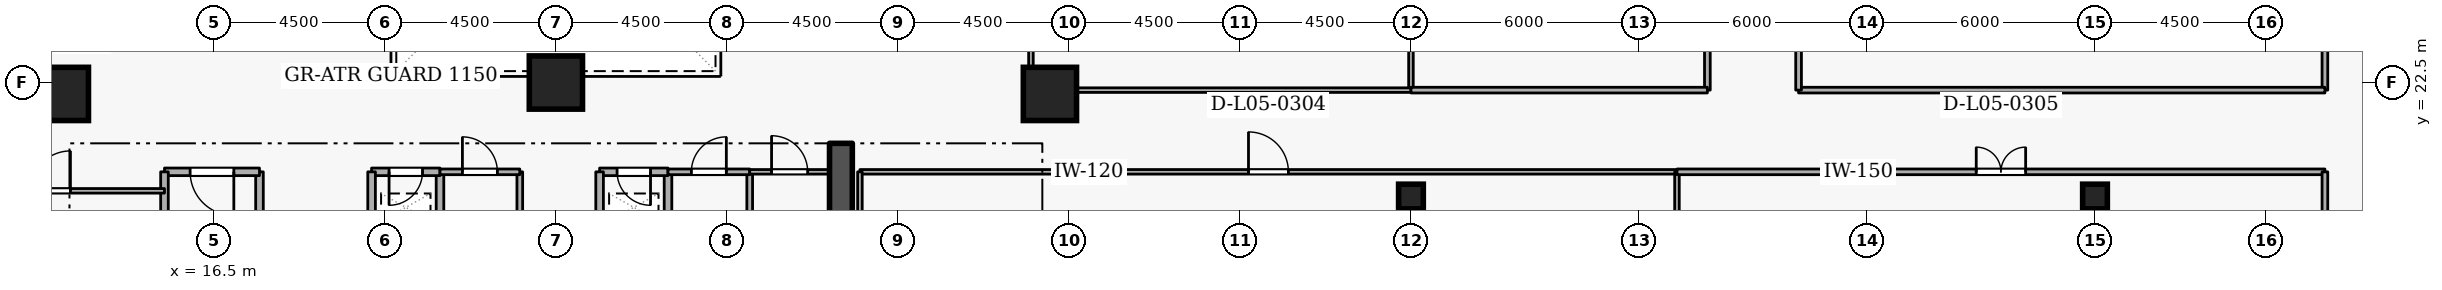
"""IFC4 building model, lengths in metres.
Left out: names, types, materials, properties, quantities, classifications, styles, units other than length and angle.
Written with IfcOpenShell. Run it as: python <this file> out.ifc"""

import sys

from ifc_helpers import new_model, si_unit, direction, frame, frame_2d, origin, origin_2d, place, context, subcontext, project, spatial, rectangle, extrude, element, fill, save


model = new_model("IFC4")
c1 = context("Model", 3, precision=1e-05, world=origin(), true_north=direction((0.0, 1.0)))
c2 = subcontext(c1, "Body", "Model", "MODEL_VIEW")
j1 = project(units=[si_unit("LENGTHUNIT", "METRE"), si_unit("PLANEANGLEUNIT", "RADIAN")], contexts=[c1])
p1 = place(None, origin())
s1 = spatial("IfcSite", under=j1, at=p1, CompositionType="ELEMENT")
p2 = place(p1, origin())
s2 = spatial("IfcBuilding", under=s1, at=p2, CompositionType="ELEMENT")
p3 = place(p2, frame((0.0, 0.0, 23.1)))
s3 = spatial("IfcBuildingStorey", under=s2, at=p3, CompositionType="ELEMENT", Elevation=23.1)
p4 = place(p3, frame((33.0, 15.2, 0.0), z_axis=(0.0, 0.0, 1.0), x_axis=(0.0, 1.0, 0.0)))
e1 = element("IfcWall", 1, at=p4, inside=s3, PredefinedType="SHEAR", context=c2, shape_type="SweptSolid", body=[
    extrude(rectangle(XDim=5.7, YDim=0.6, at=frame_2d((2.85, 0.0))), origin(), (0.0, 0.0, 1.0), 4.8),
])
for number, where, z_axis, x_axis in (
    (2, (12.5, 22.2, 0.0), (0.0, 0.0, 1.0), (1.0, 0.0, 0.0)),
    (3, (38.5, 22.2, 0.0), (0.0, 0.0, 1.0), (1.0, 0.0, 0.0)),
    (4, (25.5, 22.5, 0.0), (0.0, 0.0, 1.0), (1.0, 0.0, 0.0)),
):
    element("IfcColumn", number, at=place(p3, frame(where, z_axis=z_axis, x_axis=x_axis)), inside=s3, PredefinedType="COLUMN", context=c2, shape_type="SweptSolid", body=[
        extrude(rectangle(XDim=1.4, YDim=1.4, at=origin_2d()), origin(), (0.0, 0.0, 1.0), 4.8),
    ])
for number, where, z_axis, x_axis in (
    (5, (48.0, 19.5, 0.0), (0.0, 0.0, 1.0), (1.0, 0.0, 0.0)),
    (6, (66.0, 19.5, 0.0), (0.0, 0.0, 1.0), (1.0, 0.0, 0.0)),
):
    element("IfcColumn", number, at=place(p3, frame(where, z_axis=z_axis, x_axis=x_axis)), inside=s3, PredefinedType="COLUMN", context=c2, shape_type="SweptSolid", body=[
        extrude(rectangle(XDim=0.65, YDim=0.65, at=origin_2d()), origin(), (0.0, 0.0, 1.0), 4.8),
    ])
p5 = place(p3, frame((17.7, 18.4, 0.0), z_axis=(0.0, 0.0, 1.0), x_axis=(0.0, 1.0, 0.0)))
e7 = element("IfcWall", 7, at=p5, inside=s3, PredefinedType="STANDARD", context=c2, shape_type="SweptSolid", body=[
    extrude(rectangle(XDim=1.75, YDim=0.2, at=frame_2d((0.875, 0.0))), origin(), (0.0, 0.0, 1.0), 3.745),
])
p6 = place(p3, frame((17.7, 20.15, 0.0), z_axis=(0.0, 0.0, 1.0), x_axis=(-1.0, 0.0, 0.0)))
e8 = element("IfcWall", 8, at=p6, inside=s3, PredefinedType="STANDARD", context=c2, shape_type="SweptSolid", body=[
    extrude(rectangle(XDim=2.5, YDim=0.2, at=frame_2d((1.25, 0.0))), origin(), (0.0, 0.0, 1.0), 4.54),
])
p7 = place(p6, frame((0.675, 0.0, 0.0)))
e9 = element("IfcOpeningElement", 9, at=p7, cuts=e8, PredefinedType="OPENING", context=c2, shape_type="SweptSolid", body=[
    extrude(rectangle(XDim=1.15, YDim=2.1, at=frame_2d((0.575, 1.05))), frame((0.0, 0.11, 0.0), z_axis=(0.0, -1.0, 0.0), x_axis=(1.0, 0.0, 0.0)), (0.0, 0.0, 1.0), 0.22),
])
p8 = place(p3, frame((15.2, 20.15, 0.0), z_axis=(0.0, 0.0, 1.0), x_axis=(0.0, -1.0, 0.0)))
e10 = element("IfcWall", 10, at=p8, inside=s3, PredefinedType="STANDARD", context=c2, shape_type="SweptSolid", body=[
    extrude(rectangle(XDim=5.15, YDim=0.2, at=frame_2d((2.575, 0.0))), origin(), (0.0, 0.0, 1.0), 4.54),
])
p9 = place(p3, frame((28.45, 18.65, 0.0), z_axis=(0.0, 0.0, 1.0), x_axis=(0.0, 1.0, 0.0)))
e11 = element("IfcWall", 11, at=p9, inside=s3, PredefinedType="STANDARD", context=c2, shape_type="SweptSolid", body=[
    extrude(rectangle(XDim=1.5, YDim=0.2, at=frame_2d((0.75, 0.0))), origin(), (0.0, 0.0, 1.0), 4.54),
])
p10 = place(p3, frame((28.45, 20.15, 0.0), z_axis=(0.0, 0.0, 1.0), x_axis=(-1.0, 0.0, 0.0)))
e12 = element("IfcWall", 12, at=p10, inside=s3, PredefinedType="STANDARD", context=c2, shape_type="SweptSolid", body=[
    extrude(rectangle(XDim=1.8, YDim=0.2, at=frame_2d((0.9, 0.0))), origin(), (0.0, 0.0, 1.0), 4.54),
])
p11 = place(p10, frame((0.46, 0.0, 0.0)))
e13 = element("IfcOpeningElement", 13, at=p11, cuts=e12, PredefinedType="OPENING", context=c2, shape_type="SweptSolid", body=[
    extrude(rectangle(XDim=0.88, YDim=2.04, at=frame_2d((0.44, 1.02))), frame((0.0, 0.11, 0.0), z_axis=(0.0, -1.0, 0.0), x_axis=(1.0, 0.0, 0.0)), (0.0, 0.0, 1.0), 0.22),
])
for number, where, z_axis, x_axis in (
    (14, (26.65, 20.15, 0.0), (0.0, 0.0, 1.0), (0.0, -1.0, 0.0)),
    (15, (22.45, 18.65, 0.0), (0.0, 0.0, 1.0), (0.0, 1.0, 0.0)),
):
    element("IfcWall", number, at=place(p3, frame(where, z_axis=z_axis, x_axis=x_axis)), inside=s3, PredefinedType="STANDARD", context=c2, shape_type="SweptSolid", body=[
        extrude(rectangle(XDim=1.5, YDim=0.2, at=frame_2d((0.75, 0.0))), origin(), (0.0, 0.0, 1.0), 4.54),
    ])
p12 = place(p3, frame((22.45, 20.15, 0.0), z_axis=(0.0, 0.0, 1.0), x_axis=(-1.0, 0.0, 0.0)))
e16 = element("IfcWall", 16, at=p12, inside=s3, PredefinedType="STANDARD", context=c2, shape_type="SweptSolid", body=[
    extrude(rectangle(XDim=1.8, YDim=0.2, at=frame_2d((0.9, 0.0))), origin(), (0.0, 0.0, 1.0), 4.54),
])
p13 = place(p12, frame((0.46, 0.0, 0.0)))
e17 = element("IfcOpeningElement", 17, at=p13, cuts=e16, PredefinedType="OPENING", context=c2, shape_type="SweptSolid", body=[
    extrude(rectangle(XDim=0.88, YDim=2.04, at=frame_2d((0.44, 1.02))), frame((0.0, 0.11, 0.0), z_axis=(0.0, -1.0, 0.0), x_axis=(1.0, 0.0, 0.0)), (0.0, 0.0, 1.0), 0.22),
])
p14 = place(p3, frame((20.65, 20.15, 0.0), z_axis=(0.0, 0.0, 1.0), x_axis=(0.0, -1.0, 0.0)))
e18 = element("IfcWall", 18, at=p14, inside=s3, PredefinedType="STANDARD", context=c2, shape_type="SweptSolid", body=[
    extrude(rectangle(XDim=1.5, YDim=0.2, at=frame_2d((0.75, 0.0))), origin(), (0.0, 0.0, 1.0), 4.54),
])
p15 = place(p3, frame((24.55, 20.15, 0.0), z_axis=(0.0, 0.0, 1.0), x_axis=(0.0, -1.0, 0.0)))
e19 = element("IfcWall", 19, at=p15, inside=s3, PredefinedType="PARTITIONING", context=c2, shape_type="SweptSolid", body=[
    extrude(rectangle(XDim=1.5, YDim=0.15, at=frame_2d((0.75, 0.0))), origin(), (0.0, 0.0, 1.0), 4.54),
])
p16 = place(p3, frame((22.45, 20.15, 0.0), z_axis=(0.0, 0.0, 1.0), x_axis=(1.0, 0.0, 0.0)))
e20 = element("IfcWall", 20, at=p16, inside=s3, PredefinedType="PARTITIONING", context=c2, shape_type="SweptSolid", body=[
    extrude(rectangle(XDim=2.1, YDim=0.15, at=frame_2d((1.05, 0.0))), origin(), (0.0, 0.0, 1.0), 4.54),
])
p17 = place(p16, frame((0.59, 0.0, 0.0)))
e21 = element("IfcOpeningElement", 21, at=p17, cuts=e20, PredefinedType="OPENING", context=c2, shape_type="SweptSolid", body=[
    extrude(rectangle(XDim=0.92, YDim=2.08, at=frame_2d((0.46, 1.04))), frame((0.0, 0.085, 0.0), z_axis=(0.0, -1.0, 0.0), x_axis=(1.0, 0.0, 0.0)), (0.0, 0.0, 1.0), 0.17),
])
p18 = place(p3, frame((30.6, 20.15, 0.0), z_axis=(0.0, 0.0, 1.0), x_axis=(0.0, -1.0, 0.0)))
e22 = element("IfcWall", 22, at=p18, inside=s3, PredefinedType="PARTITIONING", context=c2, shape_type="SweptSolid", body=[
    extrude(rectangle(XDim=1.5, YDim=0.15, at=frame_2d((0.75, 0.0))), origin(), (0.0, 0.0, 1.0), 4.54),
])
p19 = place(p3, frame((28.45, 20.15, 0.0), z_axis=(0.0, 0.0, 1.0), x_axis=(1.0, 0.0, 0.0)))
e23 = element("IfcWall", 23, at=p19, inside=s3, PredefinedType="PARTITIONING", context=c2, shape_type="SweptSolid", body=[
    extrude(rectangle(XDim=2.15, YDim=0.15, at=frame_2d((1.075, 0.0))), origin(), (0.0, 0.0, 1.0), 4.54),
])
p20 = place(p19, frame((0.615, 0.0, 0.0)))
e24 = element("IfcOpeningElement", 24, at=p20, cuts=e23, PredefinedType="OPENING", context=c2, shape_type="SweptSolid", body=[
    extrude(rectangle(XDim=0.92, YDim=2.08, at=frame_2d((0.46, 1.04))), frame((0.0, 0.085, 0.0), z_axis=(0.0, -1.0, 0.0), x_axis=(1.0, 0.0, 0.0)), (0.0, 0.0, 1.0), 0.17),
])
p21 = place(p3, frame((30.6, 20.15, 0.0), z_axis=(0.0, 0.0, 1.0), x_axis=(1.0, 0.0, 0.0)))
e25 = element("IfcWall", 25, at=p21, inside=s3, PredefinedType="PARTITIONING", context=c2, shape_type="SweptSolid", body=[
    extrude(rectangle(XDim=2.1, YDim=0.12, at=frame_2d((1.05, 0.0))), origin(), (0.0, 0.0, 1.0), 4.54),
])
p22 = place(p21, frame((0.575, 0.0, 0.0)))
e26 = element("IfcOpeningElement", 26, at=p22, cuts=e25, PredefinedType="OPENING", context=c2, shape_type="SweptSolid", body=[
    extrude(rectangle(XDim=0.95, YDim=2.1, at=frame_2d((0.475, 1.05))), frame((0.0, 0.07, 0.0), z_axis=(0.0, -1.0, 0.0), x_axis=(1.0, 0.0, 0.0)), (0.0, 0.0, 1.0), 0.14),
])
p23 = place(p3, frame((9.2, 19.65, 0.0), z_axis=(0.0, 0.0, 1.0), x_axis=(1.0, 0.0, 0.0)))
e27 = element("IfcWall", 27, at=p23, inside=s3, PredefinedType="PARTITIONING", context=c2, shape_type="SweptSolid", body=[
    extrude(rectangle(XDim=6.0, YDim=0.12, at=frame_2d((3.0, 0.0))), origin(), (0.0, 0.0, 1.0), 4.54),
])
p24 = place(p23, frame((2.475, 0.0, 0.0)))
e28 = element("IfcOpeningElement", 28, at=p24, cuts=e27, PredefinedType="OPENING", context=c2, shape_type="SweptSolid", body=[
    extrude(rectangle(XDim=1.05, YDim=2.1, at=frame_2d((0.525, 1.05))), frame((0.0, 0.07, 0.0), z_axis=(0.0, -1.0, 0.0), x_axis=(1.0, 0.0, 0.0)), (0.0, 0.0, 1.0), 0.14),
])
p25 = place(p3, frame((33.5, 20.15, 0.0), z_axis=(0.0, 0.0, 1.0), x_axis=(1.0, 0.0, 0.0)))
e29 = element("IfcWall", 29, at=p25, inside=s3, PredefinedType="PARTITIONING", context=c2, shape_type="SweptSolid", body=[
    extrude(rectangle(XDim=21.5, YDim=0.12, at=frame_2d((10.75, 0.0))), origin(), (0.0, 0.0, 1.0), 4.54),
])
p26 = place(p25, frame((10.225, 0.0, 0.0)))
e30 = element("IfcOpeningElement", 30, at=p26, cuts=e29, PredefinedType="OPENING", context=c2, shape_type="SweptSolid", body=[
    extrude(rectangle(XDim=1.05, YDim=2.1, at=frame_2d((0.525, 1.05))), frame((0.0, 0.07, 0.0), z_axis=(0.0, -1.0, 0.0), x_axis=(1.0, 0.0, 0.0)), (0.0, 0.0, 1.0), 0.14),
])
p27 = place(p3, frame((55.0, 20.15, 0.0), z_axis=(0.0, 0.0, 1.0), x_axis=(0.0, -1.0, 0.0)))
e31 = element("IfcWall", 31, at=p27, inside=s3, PredefinedType="PARTITIONING", context=c2, shape_type="SweptSolid", body=[
    extrude(rectangle(XDim=7.83, YDim=0.12, at=frame_2d((3.915, 0.0))), origin(), (0.0, 0.0, 1.0), 4.54),
])
p28 = place(p3, frame((33.5, 17.648, 0.0), z_axis=(0.0, 0.0, 1.0), x_axis=(0.0, 1.0, 0.0)))
e32 = element("IfcWall", 32, at=p28, inside=s3, PredefinedType="PARTITIONING", context=c2, shape_type="SweptSolid", body=[
    extrude(rectangle(XDim=2.502, YDim=0.12, at=frame_2d((1.251, 0.0))), origin(), (0.0, 0.0, 1.0), 4.54),
])
p29 = place(p3, frame((55.0, 20.15, 0.0), z_axis=(0.0, 0.0, 1.0), x_axis=(1.0, 0.0, 0.0)))
e33 = element("IfcWall", 33, at=p29, inside=s3, PredefinedType="PARTITIONING", context=c2, shape_type="SweptSolid", body=[
    extrude(rectangle(XDim=17.05, YDim=0.15, at=frame_2d((8.525, 0.0))), origin(), (0.0, 0.0, 1.0), 4.54),
])
p30 = place(p29, frame((7.875, 0.0, 0.0)))
e34 = element("IfcOpeningElement", 34, at=p30, cuts=e33, PredefinedType="OPENING", context=c2, shape_type="SweptSolid", body=[
    extrude(rectangle(XDim=1.3, YDim=2.12, at=frame_2d((0.65, 1.06))), frame((0.0, 0.085, 0.0), z_axis=(0.0, -1.0, 0.0), x_axis=(1.0, 0.0, 0.0)), (0.0, 0.0, 1.0), 0.17),
])
p31 = place(p3, frame((72.05, 20.15, 0.0), z_axis=(0.0, 0.0, 1.0), x_axis=(0.0, -1.0, 0.0)))
e35 = element("IfcWall", 35, at=p31, inside=s3, PredefinedType="PARTITIONING", context=c2, shape_type="SweptSolid", body=[
    extrude(rectangle(XDim=5.35, YDim=0.15, at=frame_2d((2.675, 0.0))), origin(), (0.0, 0.0, 1.0), 4.54),
])
p32 = place(p3, frame((48.0, 32.28, 0.0), z_axis=(0.0, 0.0, 1.0), x_axis=(0.0, -1.0, 0.0)))
e36 = element("IfcWall", 36, at=p32, inside=s3, PredefinedType="PARTITIONING", context=c2, shape_type="SweptSolid", body=[
    extrude(rectangle(XDim=9.98, YDim=0.12, at=frame_2d((4.99, 0.0))), origin(), (0.0, 0.0, 1.0), 3.694),
])
p33 = place(p3, frame((48.0, 22.3, 0.0), z_axis=(0.0, 0.0, 1.0), x_axis=(-1.0, 0.0, 0.0)))
e37 = element("IfcWall", 37, at=p33, inside=s3, PredefinedType="PARTITIONING", context=c2, shape_type="SweptSolid", body=[
    extrude(rectangle(XDim=10.0, YDim=0.12, at=frame_2d((5.0, 0.0))), origin(), (0.0, 0.0, 1.0), 4.54),
])
p34 = place(p3, frame((38.0, 22.3, 0.0), z_axis=(0.0, 0.0, 1.0), x_axis=(0.0, 1.0, 0.0)))
e38 = element("IfcWall", 38, at=p34, inside=s3, PredefinedType="PARTITIONING", context=c2, shape_type="SweptSolid", body=[
    extrude(rectangle(XDim=9.98, YDim=0.12, at=frame_2d((4.99, 0.0))), origin(), (0.0, 0.0, 1.0), 4.54),
])
p35 = place(p3, frame((72.05, 32.28, 0.0), z_axis=(0.0, 0.0, 1.0), x_axis=(0.0, -1.0, 0.0)))
e39 = element("IfcWall", 39, at=p35, inside=s3, PredefinedType="PARTITIONING", context=c2, shape_type="SweptSolid", body=[
    extrude(rectangle(XDim=9.98, YDim=0.15, at=frame_2d((4.99, 0.0))), origin(), (0.0, 0.0, 1.0), 4.54),
])
p36 = place(p3, frame((72.05, 22.3, 0.0), z_axis=(0.0, 0.0, 1.0), x_axis=(-1.0, 0.0, 0.0)))
e40 = element("IfcWall", 40, at=p36, inside=s3, PredefinedType="PARTITIONING", context=c2, shape_type="SweptSolid", body=[
    extrude(rectangle(XDim=13.85, YDim=0.15, at=frame_2d((6.925, 0.0))), origin(), (0.0, 0.0, 1.0), 4.54),
])
p37 = place(p3, frame((58.2, 22.3, 0.0), z_axis=(0.0, 0.0, 1.0), x_axis=(0.0, 1.0, 0.0)))
e41 = element("IfcWall", 41, at=p37, inside=s3, PredefinedType="PARTITIONING", context=c2, shape_type="SweptSolid", body=[
    extrude(rectangle(XDim=9.98, YDim=0.15, at=frame_2d((4.99, 0.0))), origin(), (0.0, 0.0, 1.0), 4.54),
])
p38 = place(p3, frame((55.8, 32.28, 0.0), z_axis=(0.0, 0.0, 1.0), x_axis=(0.0, -1.0, 0.0)))
e42 = element("IfcWall", 42, at=p38, inside=s3, PredefinedType="PARTITIONING", context=c2, shape_type="SweptSolid", body=[
    extrude(rectangle(XDim=9.98, YDim=0.15, at=frame_2d((4.99, 0.0))), origin(), (0.0, 0.0, 1.0), 4.54),
])
p39 = place(p38, frame((4.34, 0.0, 0.0)))
e43 = element("IfcOpeningElement", 43, at=p39, cuts=e42, PredefinedType="OPENING", context=c2, shape_type="SweptSolid", body=[
    extrude(rectangle(XDim=1.3, YDim=2.12, at=frame_2d((0.65, 1.06))), frame((0.0, 0.085, 0.0), z_axis=(0.0, -1.0, 0.0), x_axis=(1.0, 0.0, 0.0)), (0.0, 0.0, 1.0), 0.17),
])
p40 = place(p3, frame((55.8, 22.3, 0.0), z_axis=(0.0, 0.0, 1.0), x_axis=(-1.0, 0.0, 0.0)))
e44 = element("IfcWall", 44, at=p40, inside=s3, PredefinedType="PARTITIONING", context=c2, shape_type="SweptSolid", body=[
    extrude(rectangle(XDim=7.8, YDim=0.15, at=frame_2d((3.9, 0.0))), origin(), (0.0, 0.0, 1.0), 4.54),
])
p41 = place(p7, origin())
e45 = element("IfcDoor", 45, at=p41, inside=s3, OperationType="SINGLE_SWING_LEFT", PredefinedType="DOOR", context=c2, shape_type="SweptSolid", body=[
    extrude(rectangle(XDim=1.15, YDim=2.1, at=frame_2d((0.575, 1.05))), frame((0.0, 0.025, 0.0), z_axis=(0.0, -1.0, 0.0), x_axis=(1.0, 0.0, 0.0)), (0.0, 0.0, 1.0), 0.05),
])
fill(e9, e45)
p42 = place(p11, origin())
e46 = element("IfcDoor", 46, at=p42, inside=s3, OperationType="SINGLE_SWING_LEFT", PredefinedType="DOOR", context=c2, shape_type="SweptSolid", body=[
    extrude(rectangle(XDim=0.88, YDim=2.04, at=frame_2d((0.44, 1.02))), frame((0.0, 0.025, 0.0), z_axis=(0.0, -1.0, 0.0), x_axis=(1.0, 0.0, 0.0)), (0.0, 0.0, 1.0), 0.05),
])
fill(e13, e46)
p43 = place(p13, origin())
e47 = element("IfcDoor", 47, at=p43, inside=s3, OperationType="SINGLE_SWING_RIGHT", PredefinedType="DOOR", context=c2, shape_type="SweptSolid", body=[
    extrude(rectangle(XDim=0.88, YDim=2.04, at=frame_2d((0.44, 1.02))), frame((0.0, 0.025, 0.0), z_axis=(0.0, -1.0, 0.0), x_axis=(1.0, 0.0, 0.0)), (0.0, 0.0, 1.0), 0.05),
])
fill(e17, e47)
p44 = place(p17, origin())
e48 = element("IfcDoor", 48, at=p44, inside=s3, OperationType="SINGLE_SWING_LEFT", PredefinedType="DOOR", context=c2, shape_type="SweptSolid", body=[
    extrude(rectangle(XDim=0.92, YDim=2.08, at=frame_2d((0.46, 1.04))), frame((0.0, 0.025, 0.0), z_axis=(0.0, -1.0, 0.0), x_axis=(1.0, 0.0, 0.0)), (0.0, 0.0, 1.0), 0.05),
])
fill(e21, e48)
p45 = place(p20, origin())
e49 = element("IfcDoor", 49, at=p45, inside=s3, OperationType="SINGLE_SWING_RIGHT", PredefinedType="DOOR", context=c2, shape_type="SweptSolid", body=[
    extrude(rectangle(XDim=0.92, YDim=2.08, at=frame_2d((0.46, 1.04))), frame((0.0, 0.025, 0.0), z_axis=(0.0, -1.0, 0.0), x_axis=(1.0, 0.0, 0.0)), (0.0, 0.0, 1.0), 0.05),
])
fill(e24, e49)
p46 = place(p22, origin())
e50 = element("IfcDoor", 50, at=p46, inside=s3, OperationType="SINGLE_SWING_LEFT", PredefinedType="DOOR", context=c2, shape_type="SweptSolid", body=[
    extrude(rectangle(XDim=0.95, YDim=2.1, at=frame_2d((0.475, 1.05))), frame((0.0, 0.025, 0.0), z_axis=(0.0, -1.0, 0.0), x_axis=(1.0, 0.0, 0.0)), (0.0, 0.0, 1.0), 0.05),
])
fill(e26, e50)
p47 = place(p24, origin())
e51 = element("IfcDoor", 51, at=p47, inside=s3, OperationType="SINGLE_SWING_RIGHT", PredefinedType="DOOR", context=c2, shape_type="SweptSolid", body=[
    extrude(rectangle(XDim=1.05, YDim=2.1, at=frame_2d((0.525, 1.05))), frame((0.0, 0.025, 0.0), z_axis=(0.0, -1.0, 0.0), x_axis=(1.0, 0.0, 0.0)), (0.0, 0.0, 1.0), 0.05),
])
fill(e28, e51)
p48 = place(p26, origin())
e52 = element("IfcDoor", 52, at=p48, inside=s3, OperationType="SINGLE_SWING_LEFT", PredefinedType="DOOR", context=c2, shape_type="SweptSolid", body=[
    extrude(rectangle(XDim=1.05, YDim=2.1, at=frame_2d((0.525, 1.05))), frame((0.0, 0.025, 0.0), z_axis=(0.0, -1.0, 0.0), x_axis=(1.0, 0.0, 0.0)), (0.0, 0.0, 1.0), 0.05),
])
fill(e30, e52)
p49 = place(p30, origin())
e53 = element("IfcDoor", 53, at=p49, inside=s3, OperationType="DOUBLE_DOOR_SINGLE_SWING", PredefinedType="DOOR", context=c2, shape_type="SweptSolid", body=[
    extrude(rectangle(XDim=1.3, YDim=2.12, at=frame_2d((0.65, 1.06))), frame((0.0, 0.025, 0.0), z_axis=(0.0, -1.0, 0.0), x_axis=(1.0, 0.0, 0.0)), (0.0, 0.0, 1.0), 0.05),
])
fill(e34, e53)
save(model, sys.argv[1])
